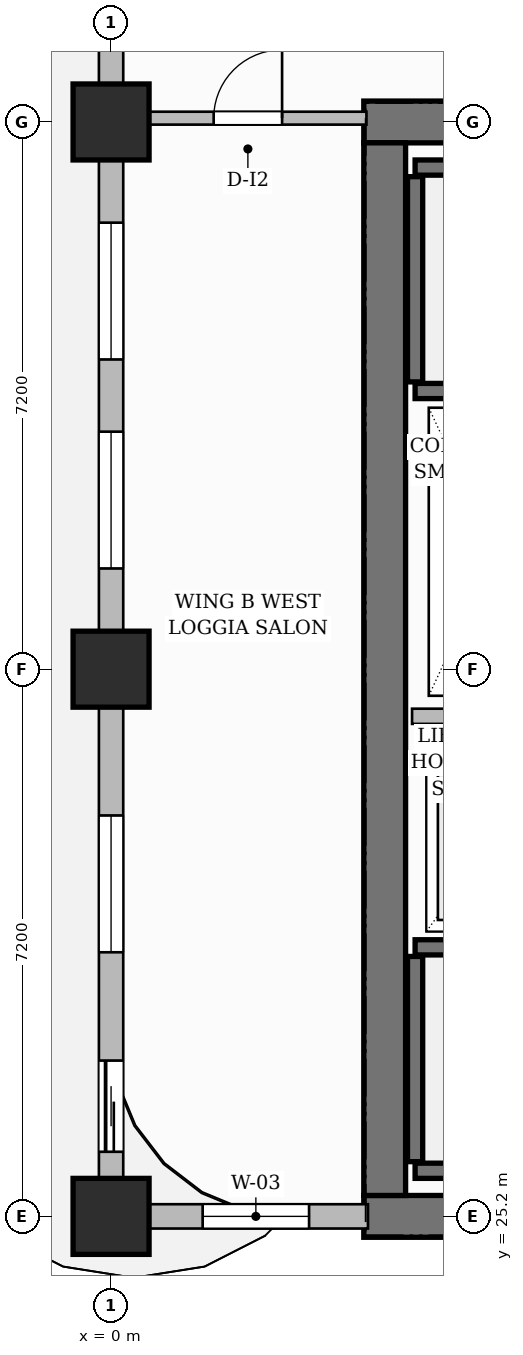
"""IFC4 building model, lengths in metres.
Left out: names, types, materials, properties, quantities, classifications, styles, units other than length and angle.
Written with IfcOpenShell. Run it as: python <this file> out.ifc"""

import sys

from ifc_helpers import new_model, si_unit, direction, frame, frame_2d, origin, origin_2d, place, context, subcontext, project, spatial, rectangle, extrude, source, transform, mapped, element, fill, save


model = new_model("IFC4")
c1 = context("Model", 3, precision=1e-05, world=origin(), true_north=direction((0.0, 1.0)))
c2 = subcontext(c1, "Body", "Model", "MODEL_VIEW")
j1 = project(units=[si_unit("LENGTHUNIT", "METRE"), si_unit("PLANEANGLEUNIT", "RADIAN")], contexts=[c1])
p1 = place(None, origin())
s1 = spatial("IfcSite", under=j1, at=p1, CompositionType="ELEMENT")
p2 = place(p1, origin())
s2 = spatial("IfcBuilding", under=s1, at=p2, CompositionType="ELEMENT")
p3 = place(p2, frame((0.0, 0.0, 130.3)))
s3 = spatial("IfcBuildingStorey", under=s2, at=p3, CompositionType="ELEMENT", Elevation=130.3)
for number, where, z_axis, x_axis in (
    (1, (3.325, 25.2, 0.0), (0.0, 0.0, 1.0), (1.0, 0.0, 0.0)),
    (2, (3.325, 39.6, 0.0), (0.0, 0.0, 1.0), (1.0, 0.0, 0.0)),
):
    element("IfcWall", number, at=place(p3, frame(where, z_axis=z_axis, x_axis=x_axis)), inside=s3, PredefinedType="SHEAR", context=c2, shape_type="SweptSolid", body=[
        extrude(rectangle(XDim=8.35, YDim=0.55, at=frame_2d((4.175, 0.0))), origin(), (0.0, 0.0, 1.0), 3.7),
    ])
p4 = place(p3, frame((3.6, 25.475, 0.0), z_axis=(0.0, 0.0, 1.0), x_axis=(0.0, 1.0, 0.0)))
e3 = element("IfcWall", 3, at=p4, inside=s3, PredefinedType="SHEAR", context=c2, shape_type="SweptSolid", body=[
    extrude(rectangle(XDim=13.85, YDim=0.55, at=frame_2d((6.925, 0.0))), origin(), (0.0, 0.0, 1.0), 3.7),
])
m1 = source(origin(), c2, "Body", "SweptSolid", [
    extrude(rectangle(XDim=1.0, YDim=1.0, at=origin_2d()), origin(), (0.0, 0.0, 1.0), 3.7),
])
for number, where, z_axis, x_axis in (
    (4, (0.0, 25.2, 0.0), (0.0, 0.0, 1.0), (1.0, 0.0, 0.0)),
    (5, (0.0, 32.4, 0.0), (0.0, 0.0, 1.0), (1.0, 0.0, 0.0)),
    (6, (0.0, 39.6, 0.0), (0.0, 0.0, 1.0), (1.0, 0.0, 0.0)),
):
    element("IfcColumn", number, at=place(p3, frame(where, z_axis=z_axis, x_axis=x_axis)), inside=s3, PredefinedType="COLUMN", context=c2, shape_type="MappedRepresentation", body=[
        mapped(m1, transform((0.0, 0.0, 0.0), scale=1.0)),
    ])
p5 = place(p3, frame((4.0, 25.8, 0.0), z_axis=(0.0, 0.0, 1.0), x_axis=(1.0, 0.0, 0.0)))
e7 = element("IfcWall", 7, at=p5, inside=s3, PredefinedType="SHEAR", context=c2, shape_type="SweptSolid", body=[
    extrude(rectangle(XDim=7.1, YDim=0.2, at=frame_2d((3.55, 0.0))), origin(), (0.0, 0.0, 1.0), 3.7),
])
p6 = place(p3, frame((4.0, 25.92, 0.0), z_axis=(0.0, 0.0, 1.0), x_axis=(0.0, 1.0, 0.0)))
e8 = element("IfcWall", 8, at=p6, inside=s3, PredefinedType="SHEAR", context=c2, shape_type="SweptSolid", body=[
    extrude(rectangle(XDim=2.7, YDim=0.2, at=frame_2d((1.35, 0.0))), origin(), (0.0, 0.0, 1.0), 3.7),
])
p7 = place(p3, frame((4.0, 28.74, 0.0), z_axis=(0.0, 0.0, 1.0), x_axis=(1.0, 0.0, 0.0)))
e9 = element("IfcWall", 9, at=p7, inside=s3, PredefinedType="SHEAR", context=c2, shape_type="SweptSolid", body=[
    extrude(rectangle(XDim=7.1, YDim=0.2, at=frame_2d((3.55, 0.0))), origin(), (0.0, 0.0, 1.0), 3.7),
])
p8 = place(p7, frame((5.815, 0.0, 0.0)))
e10 = element("IfcOpeningElement", 10, at=p8, cuts=e9, PredefinedType="OPENING", context=c2, shape_type="SweptSolid", body=[
    extrude(rectangle(XDim=1.05, YDim=2.2, at=frame_2d((0.525, 1.1))), frame((0.0, 0.11, 0.0), z_axis=(0.0, -1.0, 0.0), x_axis=(1.0, 0.0, 0.0)), (0.0, 0.0, 1.0), 0.22),
])
p9 = place(p3, frame((4.0, 39.0, 0.0), z_axis=(0.0, 0.0, 1.0), x_axis=(1.0, 0.0, 0.0)))
e11 = element("IfcWall", 11, at=p9, inside=s3, PredefinedType="SHEAR", context=c2, shape_type="SweptSolid", body=[
    extrude(rectangle(XDim=7.1, YDim=0.2, at=frame_2d((3.55, 0.0))), origin(), (0.0, 0.0, 1.0), 3.7),
])
p10 = place(p3, frame((4.0, 36.18, 0.0), z_axis=(0.0, 0.0, 1.0), x_axis=(0.0, 1.0, 0.0)))
e12 = element("IfcWall", 12, at=p10, inside=s3, PredefinedType="SHEAR", context=c2, shape_type="SweptSolid", body=[
    extrude(rectangle(XDim=2.7, YDim=0.2, at=frame_2d((1.35, 0.0))), origin(), (0.0, 0.0, 1.0), 3.7),
])
p11 = place(p3, frame((4.0, 36.06, 0.0), z_axis=(0.0, 0.0, 1.0), x_axis=(1.0, 0.0, 0.0)))
e13 = element("IfcWall", 13, at=p11, inside=s3, PredefinedType="SHEAR", context=c2, shape_type="SweptSolid", body=[
    extrude(rectangle(XDim=7.1, YDim=0.2, at=frame_2d((3.55, 0.0))), origin(), (0.0, 0.0, 1.0), 3.7),
])
p12 = place(p11, frame((5.815, 0.0, 0.0)))
e14 = element("IfcOpeningElement", 14, at=p12, cuts=e13, PredefinedType="OPENING", context=c2, shape_type="SweptSolid", body=[
    extrude(rectangle(XDim=1.05, YDim=2.2, at=frame_2d((0.525, 1.1))), frame((0.0, 0.11, 0.0), z_axis=(0.0, -1.0, 0.0), x_axis=(1.0, 0.0, 0.0)), (0.0, 0.0, 1.0), 0.22),
])
p13 = place(p3, frame((3.96, 31.78, 0.0), z_axis=(0.0, 0.0, 1.0), x_axis=(1.0, 0.0, 0.0)))
e15 = element("IfcWall", 15, at=p13, inside=s3, PredefinedType="PARTITIONING", context=c2, shape_type="SweptSolid", body=[
    extrude(rectangle(XDim=2.13, YDim=0.2, at=frame_2d((1.065, 0.0))), origin(), (0.0, 0.0, 1.0), 3.45),
])
p14 = place(p3, frame((0.24, 39.65, 0.0), z_axis=(0.0, 0.0, 1.0), x_axis=(1.0, 0.0, 0.0)))
e16 = element("IfcWall", 16, at=p14, inside=s3, PredefinedType="PARTITIONING", context=c2, shape_type="SweptSolid", body=[
    extrude(rectangle(XDim=3.12, YDim=0.17, at=frame_2d((1.56, 0.0))), origin(), (0.0, 0.0, 1.0), 3.45),
])
p15 = place(p14, frame((1.11, 0.0, 0.0)))
e17 = element("IfcOpeningElement", 17, at=p15, cuts=e16, PredefinedType="OPENING", context=c2, shape_type="SweptSolid", body=[
    extrude(rectangle(XDim=0.9, YDim=2.15, at=frame_2d((0.45, 1.075))), frame((0.0, 0.095, 0.0), z_axis=(0.0, -1.0, 0.0), x_axis=(1.0, 0.0, 0.0)), (0.0, 0.0, 1.0), 0.19),
])
p16 = place(p3, frame((0.0, 25.2, 0.0), z_axis=(0.0, 0.0, 1.0), x_axis=(1.0, 0.0, 0.0)))
e18 = element("IfcWall", 18, at=p16, inside=s3, PredefinedType="SOLIDWALL", context=c2, shape_type="SweptSolid", body=[
    extrude(rectangle(XDim=3.38, YDim=0.32, at=frame_2d((1.69, 0.0))), origin(), (0.0, 0.0, 1.0), 3.45),
])
p17 = place(p16, frame((1.205, 0.0, 0.8)))
e19 = element("IfcOpeningElement", 19, at=p17, cuts=e18, PredefinedType="OPENING", context=c2, shape_type="SweptSolid", body=[
    extrude(rectangle(XDim=1.4, YDim=1.85, at=frame_2d((0.7, 0.925))), frame((0.0, 0.17, 0.0), z_axis=(0.0, -1.0, 0.0), x_axis=(1.0, 0.0, 0.0)), (0.0, 0.0, 1.0), 0.34),
])
p18 = place(p3, frame((0.0, 25.25, 0.0), z_axis=(0.0, 0.0, 1.0), x_axis=(0.0, 1.0, 0.0)))
e20 = element("IfcWall", 20, at=p18, inside=s3, PredefinedType="SOLIDWALL", context=c2, shape_type="SweptSolid", body=[
    extrude(rectangle(XDim=21.5, YDim=0.32, at=frame_2d((10.75, 0.0))), origin(), (0.0, 0.0, 1.0), 2.935),
])
p19 = place(p18, frame((18.45, 0.0, 0.0)))
e21 = element("IfcOpeningElement", 21, at=p19, cuts=e20, PredefinedType="OPENING", context=c2, shape_type="SweptSolid", body=[
    extrude(rectangle(XDim=1.2, YDim=2.2, at=frame_2d((0.6, 1.1))), frame((0.0, 0.17, 0.0), z_axis=(0.0, -1.0, 0.0), x_axis=(1.0, 0.0, 0.0)), (0.0, 0.0, 1.0), 0.34),
])
p20 = place(p18, frame((0.8, 0.0, 0.0)))
e22 = element("IfcOpeningElement", 22, at=p20, cuts=e20, PredefinedType="OPENING", context=c2, shape_type="SweptSolid", body=[
    extrude(rectangle(XDim=1.2, YDim=2.2, at=frame_2d((0.6, 1.1))), frame((0.0, 0.17, 0.0), z_axis=(0.0, -1.0, 0.0), x_axis=(1.0, 0.0, 0.0)), (0.0, 0.0, 1.0), 0.34),
])
p21 = place(p18, frame((3.425, 0.0, 0.8)))
e23 = element("IfcOpeningElement", 23, at=p21, cuts=e20, PredefinedType="OPENING", context=c2, shape_type="SweptSolid", body=[
    extrude(rectangle(XDim=1.8, YDim=1.85, at=frame_2d((0.9, 0.925))), frame((0.0, 0.17, 0.0), z_axis=(0.0, -1.0, 0.0), x_axis=(1.0, 0.0, 0.0)), (0.0, 0.0, 1.0), 0.34),
])
p22 = place(p18, frame((8.475, 0.0, 0.8)))
e24 = element("IfcOpeningElement", 24, at=p22, cuts=e20, PredefinedType="OPENING", context=c2, shape_type="SweptSolid", body=[
    extrude(rectangle(XDim=1.8, YDim=1.85, at=frame_2d((0.9, 0.925))), frame((0.0, 0.17, 0.0), z_axis=(0.0, -1.0, 0.0), x_axis=(1.0, 0.0, 0.0)), (0.0, 0.0, 1.0), 0.34),
])
p23 = place(p18, frame((11.225, 0.0, 0.8)))
e25 = element("IfcOpeningElement", 25, at=p23, cuts=e20, PredefinedType="OPENING", context=c2, shape_type="SweptSolid", body=[
    extrude(rectangle(XDim=1.8, YDim=1.85, at=frame_2d((0.9, 0.925))), frame((0.0, 0.17, 0.0), z_axis=(0.0, -1.0, 0.0), x_axis=(1.0, 0.0, 0.0)), (0.0, 0.0, 1.0), 0.34),
])
p24 = place(p18, frame((15.75, 0.0, 0.8)))
e26 = element("IfcOpeningElement", 26, at=p24, cuts=e20, PredefinedType="OPENING", context=c2, shape_type="SweptSolid", body=[
    extrude(rectangle(XDim=1.8, YDim=1.85, at=frame_2d((0.9, 0.925))), frame((0.0, 0.17, 0.0), z_axis=(0.0, -1.0, 0.0), x_axis=(1.0, 0.0, 0.0)), (0.0, 0.0, 1.0), 0.34),
])
m2 = source(origin(), c2, "Body", "SweptSolid", [
    extrude(rectangle(XDim=0.9, YDim=2.15, at=frame_2d((0.45, 1.075))), frame((0.0, 0.025, 0.0), z_axis=(0.0, -1.0, 0.0), x_axis=(1.0, 0.0, 0.0)), (0.0, 0.0, 1.0), 0.05),
])
p25 = place(p15, origin())
e27 = element("IfcDoor", 27, at=p25, inside=s3, OperationType="SINGLE_SWING_RIGHT", PredefinedType="DOOR", context=c2, shape_type="MappedRepresentation", body=[
    mapped(m2, transform((0.0, 0.0, 0.0), scale=1.0)),
])
fill(e17, e27)
m3 = source(origin(), c2, "Body", "SweptSolid", [
    extrude(rectangle(XDim=1.2, YDim=2.2, at=frame_2d((0.6, 1.1))), frame((0.0, 0.025, 0.0), z_axis=(0.0, -1.0, 0.0), x_axis=(1.0, 0.0, 0.0)), (0.0, 0.0, 1.0), 0.05),
])
p26 = place(p20, origin())
e28 = element("IfcDoor", 28, at=p26, inside=s3, OperationType="SLIDING_TO_LEFT", PredefinedType="DOOR", context=c2, shape_type="MappedRepresentation", body=[
    mapped(m3, transform((0.0, 0.0, 0.0), scale=1.0)),
])
fill(e22, e28)
m4 = source(origin(), c2, "Body", "SweptSolid", [
    extrude(rectangle(XDim=1.4, YDim=1.85, at=frame_2d((0.7, 0.925))), frame((0.0, 0.03, 0.0), z_axis=(0.0, -1.0, 0.0), x_axis=(1.0, 0.0, 0.0)), (0.0, 0.0, 1.0), 0.06),
])
p27 = place(p17, origin())
e29 = element("IfcWindow", 29, at=p27, inside=s3, PartitioningType="SINGLE_PANEL", PredefinedType="WINDOW", context=c2, shape_type="MappedRepresentation", body=[
    mapped(m4, transform((0.0, 0.0, 0.0), scale=1.0)),
])
fill(e19, e29)
m5 = source(origin(), c2, "Body", "SweptSolid", [
    extrude(rectangle(XDim=1.8, YDim=1.85, at=frame_2d((0.9, 0.925))), frame((0.0, 0.03, 0.0), z_axis=(0.0, -1.0, 0.0), x_axis=(1.0, 0.0, 0.0)), (0.0, 0.0, 1.0), 0.06),
])
p28 = place(p21, origin())
e30 = element("IfcWindow", 30, at=p28, inside=s3, PartitioningType="DOUBLE_PANEL_VERTICAL", PredefinedType="WINDOW", context=c2, shape_type="MappedRepresentation", body=[
    mapped(m5, transform((0.0, 0.0, 0.0), scale=1.0)),
])
fill(e23, e30)
p29 = place(p22, origin())
e31 = element("IfcWindow", 31, at=p29, inside=s3, PartitioningType="DOUBLE_PANEL_VERTICAL", PredefinedType="WINDOW", context=c2, shape_type="MappedRepresentation", body=[
    mapped(m5, transform((0.0, 0.0, 0.0), scale=1.0)),
])
fill(e24, e31)
p30 = place(p23, origin())
e32 = element("IfcWindow", 32, at=p30, inside=s3, PartitioningType="DOUBLE_PANEL_VERTICAL", PredefinedType="WINDOW", context=c2, shape_type="MappedRepresentation", body=[
    mapped(m5, transform((0.0, 0.0, 0.0), scale=1.0)),
])
fill(e25, e32)
save(model, sys.argv[1])
